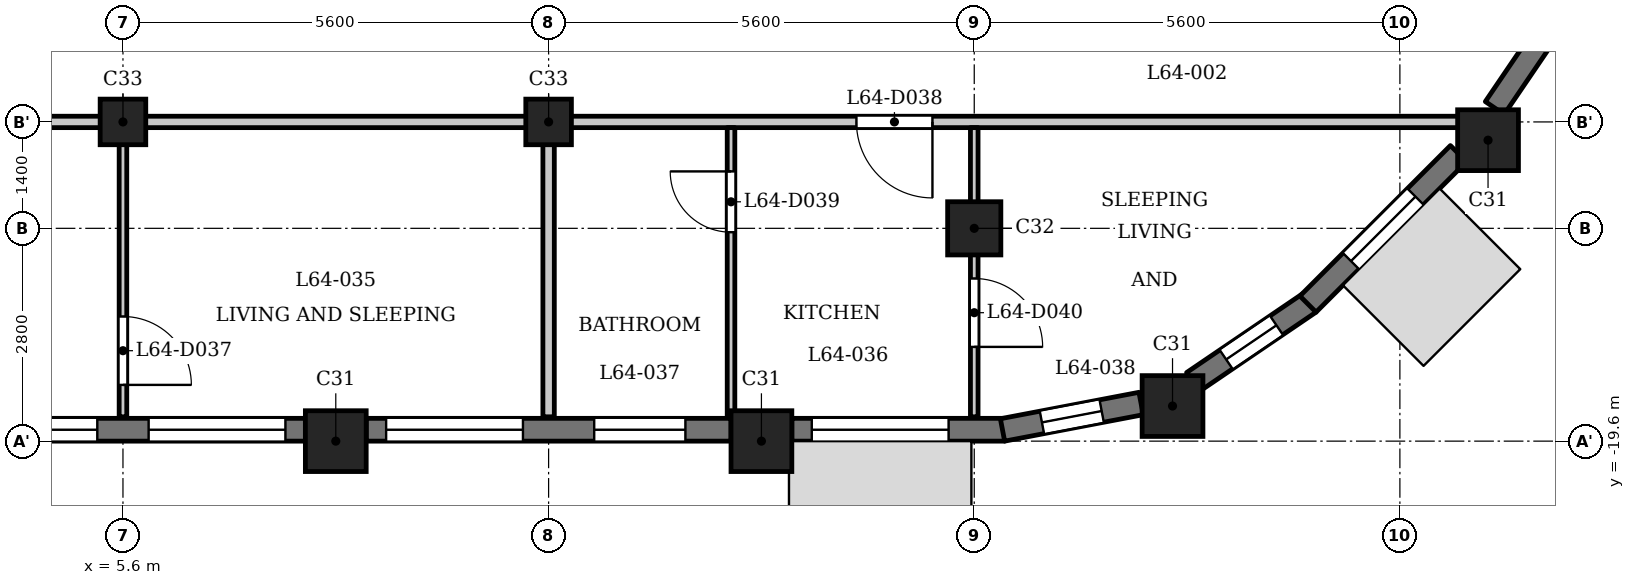
"""IFC4 building model, lengths in metres.
Left out: names, types, materials, properties, quantities, classifications, styles, units other than length and angle.
Written with IfcOpenShell. Run it as: python <this file> out.ifc"""

import sys

from ifc_helpers import new_model, si_unit, direction, frame, frame_2d, origin, origin_2d, place, context, subcontext, project, spatial, rectangle, extrude, element, fill, save


model = new_model("IFC4")
c1 = context("Model", 3, precision=1e-05, world=origin(), true_north=direction((0.0, 1.0)))
c2 = subcontext(c1, "Body", "Model", "MODEL_VIEW")
j1 = project(units=[si_unit("LENGTHUNIT", "METRE"), si_unit("PLANEANGLEUNIT", "RADIAN")], contexts=[c1])
p1 = place(None, origin())
s1 = spatial("IfcSite", under=j1, at=p1, CompositionType="ELEMENT")
p2 = place(p1, origin())
s2 = spatial("IfcBuilding", under=s1, at=p2, CompositionType="ELEMENT")
p3 = place(p2, frame((0.0, 0.0, 248.7)))
s3 = spatial("IfcBuildingStorey", under=s2, at=p3, CompositionType="ELEMENT", Elevation=248.7)
for number, where, z_axis, x_axis in (
    (1, (8.4, -19.6, 0.0), (0.0, 0.0, 1.0), (1.0, 0.0, 0.0)),
    (2, (14.0, -19.6, 0.0), (0.0, 0.0, 1.0), (1.0, 0.0, 0.0)),
    (3, (19.409, -19.138, 0.0), (0.0, 0.0, 1.0), (1.0, 0.0, 0.0)),
    (4, (23.56, -15.64, 0.0), (0.0, 0.0, 1.0), (1.0, 0.0, 0.0)),
):
    element("IfcColumn", number, at=place(p3, frame(where, z_axis=z_axis, x_axis=x_axis)), inside=s3, PredefinedType="COLUMN", context=c2, shape_type="SweptSolid", body=[
        extrude(rectangle(XDim=0.8, YDim=0.8, at=origin_2d()), origin(), (0.0, 0.0, 1.0), 3.5),
    ])
p4 = place(p3, frame((16.8, -16.8, 0.0), z_axis=(0.0, 0.0, 1.0), x_axis=(1.0, 0.0, 0.0)))
e5 = element("IfcColumn", 5, at=p4, inside=s3, PredefinedType="COLUMN", context=c2, shape_type="SweptSolid", body=[
    extrude(rectangle(XDim=0.7, YDim=0.7, at=origin_2d()), origin(), (0.0, 0.0, 1.0), 3.5),
])
for number, where, z_axis, x_axis in (
    (6, (5.6, -15.4, 0.0), (0.0, 0.0, 1.0), (1.0, 0.0, 0.0)),
    (7, (11.2, -15.4, 0.0), (0.0, 0.0, 1.0), (1.0, 0.0, 0.0)),
):
    element("IfcColumn", number, at=place(p3, frame(where, z_axis=z_axis, x_axis=x_axis)), inside=s3, PredefinedType="COLUMN", context=c2, shape_type="SweptSolid", body=[
        extrude(rectangle(XDim=0.6, YDim=0.6, at=origin_2d()), origin(), (0.0, 0.0, 1.0), 3.5),
    ])
p5 = place(p3, frame((3.2, -19.45, 0.0), z_axis=(0.0, 0.0, 1.0), x_axis=(1.0, 0.0, 0.0)))
e8 = element("IfcWall", 8, at=p5, inside=s3, PredefinedType="SOLIDWALL", context=c2, shape_type="SweptSolid", body=[
    extrude(rectangle(XDim=4.8, YDim=0.3, at=frame_2d((2.4, 0.0))), origin(), (0.0, 0.0, 1.0), 2.55),
])
p6 = place(p5, frame((0.262, 0.0, 0.9)))
e9 = element("IfcOpeningElement", 9, at=p6, cuts=e8, PredefinedType="OPENING", context=c2, shape_type="SweptSolid", body=[
    extrude(rectangle(XDim=1.8, YDim=1.25, at=frame_2d((0.9, 0.625))), frame((0.0, 0.16, 0.0), z_axis=(0.0, -1.0, 0.0), x_axis=(1.0, 0.0, 0.0)), (0.0, 0.0, 1.0), 0.32),
])
p7 = place(p5, frame((2.738, 0.0, 0.9)))
e10 = element("IfcOpeningElement", 10, at=p7, cuts=e8, PredefinedType="OPENING", context=c2, shape_type="SweptSolid", body=[
    extrude(rectangle(XDim=1.8, YDim=1.25, at=frame_2d((0.9, 0.625))), frame((0.0, 0.16, 0.0), z_axis=(0.0, -1.0, 0.0), x_axis=(1.0, 0.0, 0.0)), (0.0, 0.0, 1.0), 0.32),
])
p8 = place(p3, frame((8.8, -19.45, 0.0), z_axis=(0.0, 0.0, 1.0), x_axis=(1.0, 0.0, 0.0)))
e11 = element("IfcWall", 11, at=p8, inside=s3, PredefinedType="SOLIDWALL", context=c2, shape_type="SweptSolid", body=[
    extrude(rectangle(XDim=4.8, YDim=0.3, at=frame_2d((2.4, 0.0))), origin(), (0.0, 0.0, 1.0), 2.55),
])
p9 = place(p8, frame((0.262, 0.0, 0.9)))
e12 = element("IfcOpeningElement", 12, at=p9, cuts=e11, PredefinedType="OPENING", context=c2, shape_type="SweptSolid", body=[
    extrude(rectangle(XDim=1.8, YDim=1.25, at=frame_2d((0.9, 0.625))), frame((0.0, 0.16, 0.0), z_axis=(0.0, -1.0, 0.0), x_axis=(1.0, 0.0, 0.0)), (0.0, 0.0, 1.0), 0.32),
])
p10 = place(p8, frame((3.0, 0.0, 0.6)))
e13 = element("IfcOpeningElement", 13, at=p10, cuts=e11, PredefinedType="OPENING", context=c2, shape_type="SweptSolid", body=[
    extrude(rectangle(XDim=1.2, YDim=1.55, at=frame_2d((0.6, 0.775))), frame((0.0, 0.16, 0.0), z_axis=(0.0, -1.0, 0.0), x_axis=(1.0, 0.0, 0.0)), (0.0, 0.0, 1.0), 0.32),
])
p11 = place(p3, frame((14.4, -19.45, 0.0), z_axis=(0.0, 0.0, 1.0), x_axis=(1.0, 0.0, 0.0)))
e14 = element("IfcWall", 14, at=p11, inside=s3, PredefinedType="SOLIDWALL", context=c2, shape_type="SweptSolid", body=[
    extrude(rectangle(XDim=2.8, YDim=0.3, at=frame_2d((1.4, 0.0))), origin(), (0.0, 0.0, 1.0), 2.55),
])
p12 = place(p11, frame((0.262, 0.0, 0.9)))
e15 = element("IfcOpeningElement", 15, at=p12, cuts=e14, PredefinedType="OPENING", context=c2, shape_type="SweptSolid", body=[
    extrude(rectangle(XDim=1.8, YDim=1.25, at=frame_2d((0.9, 0.625))), frame((0.0, 0.16, 0.0), z_axis=(0.0, -1.0, 0.0), x_axis=(1.0, 0.0, 0.0)), (0.0, 0.0, 1.0), 0.32),
])
p13 = place(p3, frame((17.172, -19.453, 0.0), z_axis=(0.0, 0.0, 1.0), x_axis=(0.982301706131, 0.187305520826, 0.0)))
e16 = element("IfcWall", 16, at=p13, inside=s3, PredefinedType="SOLIDWALL", context=c2, shape_type="SweptSolid", body=[
    extrude(rectangle(XDim=1.856, YDim=0.3, at=frame_2d((0.928, 0.0))), origin(), (0.0, 0.0, 1.0), 2.55),
])
p14 = place(p13, frame((0.528, 0.0, 0.6)))
e17 = element("IfcOpeningElement", 17, at=p14, cuts=e16, PredefinedType="OPENING", context=c2, shape_type="SweptSolid", body=[
    extrude(rectangle(XDim=0.8, YDim=1.55, at=frame_2d((0.4, 0.775))), frame((0.0, 0.16, 0.0), z_axis=(0.0, -1.0, 0.0), x_axis=(1.0, 0.0, 0.0)), (0.0, 0.0, 1.0), 0.32),
])
p15 = place(p3, frame((19.678, -18.822, 0.0), z_axis=(0.0, 0.0, 1.0), x_axis=(0.826997446962, 0.562205676526, 0.0)))
e18 = element("IfcWall", 18, at=p15, inside=s3, PredefinedType="SOLIDWALL", context=c2, shape_type="SweptSolid", body=[
    extrude(rectangle(XDim=1.856, YDim=0.3, at=frame_2d((0.928, 0.0))), origin(), (0.0, 0.0, 1.0), 2.55),
])
p16 = place(p15, frame((0.528, 0.0, 0.6)))
e19 = element("IfcOpeningElement", 19, at=p16, cuts=e18, PredefinedType="OPENING", context=c2, shape_type="SweptSolid", body=[
    extrude(rectangle(XDim=0.8, YDim=1.55, at=frame_2d((0.4, 0.775))), frame((0.0, 0.16, 0.0), z_axis=(0.0, -1.0, 0.0), x_axis=(1.0, 0.0, 0.0)), (0.0, 0.0, 1.0), 0.32),
])
p17 = place(p3, frame((21.191, -17.797, 0.0), z_axis=(0.0, 0.0, 1.0), x_axis=(0.707106781187, 0.707106781187, 0.0)))
e20 = element("IfcWall", 20, at=p17, inside=s3, PredefinedType="SOLIDWALL", context=c2, shape_type="SweptSolid", body=[
    extrude(rectangle(XDim=2.8, YDim=0.3, at=frame_2d((1.4, 0.0))), origin(), (0.0, 0.0, 1.0), 2.55),
])
p18 = place(p17, frame((0.8, 0.0, 0.6)))
e21 = element("IfcOpeningElement", 21, at=p18, cuts=e20, PredefinedType="OPENING", context=c2, shape_type="SweptSolid", body=[
    extrude(rectangle(XDim=1.2, YDim=1.55, at=frame_2d((0.6, 0.775))), frame((0.0, 0.16, 0.0), z_axis=(0.0, -1.0, 0.0), x_axis=(1.0, 0.0, 0.0)), (0.0, 0.0, 1.0), 0.32),
])
p19 = place(p3, frame((23.648, -15.217, 0.0), z_axis=(0.0, 0.0, 1.0), x_axis=(0.562043265151, 0.827107833416, 0.0)))
e22 = element("IfcWall", 22, at=p19, inside=s3, PredefinedType="SOLIDWALL", context=c2, shape_type="SweptSolid", body=[
    extrude(rectangle(XDim=1.377, YDim=0.3, at=frame_2d((0.688, 0.0))), origin(), (0.0, 0.0, 1.0), 2.55),
])
p20 = place(p3, frame((-23.322, -15.4, 0.0), z_axis=(0.0, 0.0, 1.0), x_axis=(1.0, 0.0, 0.0)))
e23 = element("IfcWall", 23, at=p20, inside=s3, PredefinedType="PARTITIONING", context=c2, shape_type="SweptSolid", body=[
    extrude(rectangle(XDim=46.872, YDim=0.15, at=frame_2d((23.436, 0.0))), origin(), (0.0, 0.0, 1.0), 3.2),
])
p21 = place(p20, frame((7.172, 0.0, 0.0)))
e24 = element("IfcOpeningElement", 24, at=p21, cuts=e23, PredefinedType="OPENING", context=c2, shape_type="SweptSolid", body=[
    extrude(rectangle(XDim=1.0, YDim=2.1, at=frame_2d((0.5, 1.05))), frame((0.0, 0.085, 0.0), z_axis=(0.0, -1.0, 0.0), x_axis=(1.0, 0.0, 0.0)), (0.0, 0.0, 1.0), 0.17),
])
p22 = place(p20, frame((19.372, 0.0, 0.0)))
e25 = element("IfcOpeningElement", 25, at=p22, cuts=e23, PredefinedType="OPENING", context=c2, shape_type="SweptSolid", body=[
    extrude(rectangle(XDim=1.0, YDim=2.1, at=frame_2d((0.5, 1.05))), frame((0.0, 0.085, 0.0), z_axis=(0.0, -1.0, 0.0), x_axis=(1.0, 0.0, 0.0)), (0.0, 0.0, 1.0), 0.17),
])
p23 = place(p20, frame((26.372, 0.0, 0.0)))
e26 = element("IfcOpeningElement", 26, at=p23, cuts=e23, PredefinedType="OPENING", context=c2, shape_type="SweptSolid", body=[
    extrude(rectangle(XDim=1.0, YDim=2.1, at=frame_2d((0.5, 1.05))), frame((0.0, 0.085, 0.0), z_axis=(0.0, -1.0, 0.0), x_axis=(1.0, 0.0, 0.0)), (0.0, 0.0, 1.0), 0.17),
])
p24 = place(p20, frame((38.572, 0.0, 0.0)))
e27 = element("IfcOpeningElement", 27, at=p24, cuts=e23, PredefinedType="OPENING", context=c2, shape_type="SweptSolid", body=[
    extrude(rectangle(XDim=1.0, YDim=2.1, at=frame_2d((0.5, 1.05))), frame((0.0, 0.085, 0.0), z_axis=(0.0, -1.0, 0.0), x_axis=(1.0, 0.0, 0.0)), (0.0, 0.0, 1.0), 0.17),
])
p25 = place(p3, frame((5.6, -19.28, 0.0), z_axis=(0.0, 0.0, 1.0), x_axis=(0.0, 1.0, 0.0)))
e28 = element("IfcWall", 28, at=p25, inside=s3, PredefinedType="PARTITIONING", context=c2, shape_type="SweptSolid", body=[
    extrude(rectangle(XDim=3.805, YDim=0.1, at=frame_2d((1.902, 0.0))), origin(), (0.0, 0.0, 1.0), 3.2),
])
p26 = place(p25, frame((0.42, 0.0, 0.0)))
e29 = element("IfcOpeningElement", 29, at=p26, cuts=e28, PredefinedType="OPENING", context=c2, shape_type="SweptSolid", body=[
    extrude(rectangle(XDim=0.9, YDim=2.1, at=frame_2d((0.45, 1.05))), frame((0.0, 0.06, 0.0), z_axis=(0.0, -1.0, 0.0), x_axis=(1.0, 0.0, 0.0)), (0.0, 0.0, 1.0), 0.12),
])
p27 = place(p3, frame((11.2, -19.28, 0.0), z_axis=(0.0, 0.0, 1.0), x_axis=(0.0, 1.0, 0.0)))
e30 = element("IfcWall", 30, at=p27, inside=s3, PredefinedType="PARTITIONING", context=c2, shape_type="SweptSolid", body=[
    extrude(rectangle(XDim=3.805, YDim=0.15, at=frame_2d((1.902, 0.0))), origin(), (0.0, 0.0, 1.0), 3.2),
])
p28 = place(p3, frame((13.6, -19.28, 0.0), z_axis=(0.0, 0.0, 1.0), x_axis=(0.0, 1.0, 0.0)))
e31 = element("IfcWall", 31, at=p28, inside=s3, PredefinedType="PARTITIONING", context=c2, shape_type="SweptSolid", body=[
    extrude(rectangle(XDim=3.805, YDim=0.1, at=frame_2d((1.902, 0.0))), origin(), (0.0, 0.0, 1.0), 3.2),
])
p29 = place(p28, frame((2.429, 0.0, 0.0)))
e32 = element("IfcOpeningElement", 32, at=p29, cuts=e31, PredefinedType="OPENING", context=c2, shape_type="SweptSolid", body=[
    extrude(rectangle(XDim=0.8, YDim=2.1, at=frame_2d((0.4, 1.05))), frame((0.0, 0.06, 0.0), z_axis=(0.0, -1.0, 0.0), x_axis=(1.0, 0.0, 0.0)), (0.0, 0.0, 1.0), 0.12),
])
p30 = place(p3, frame((16.8, -19.28, 0.0), z_axis=(0.0, 0.0, 1.0), x_axis=(0.0, 1.0, 0.0)))
e33 = element("IfcWall", 33, at=p30, inside=s3, PredefinedType="PARTITIONING", context=c2, shape_type="SweptSolid", body=[
    extrude(rectangle(XDim=3.805, YDim=0.1, at=frame_2d((1.902, 0.0))), origin(), (0.0, 0.0, 1.0), 3.2),
])
p31 = place(p30, frame((0.92, 0.0, 0.0)))
e34 = element("IfcOpeningElement", 34, at=p31, cuts=e33, PredefinedType="OPENING", context=c2, shape_type="SweptSolid", body=[
    extrude(rectangle(XDim=0.9, YDim=2.1, at=frame_2d((0.45, 1.05))), frame((0.0, 0.06, 0.0), z_axis=(0.0, -1.0, 0.0), x_axis=(1.0, 0.0, 0.0)), (0.0, 0.0, 1.0), 0.12),
])
p32 = place(p26, origin())
e35 = element("IfcDoor", 35, at=p32, inside=s3, OperationType="SINGLE_SWING_LEFT", PredefinedType="DOOR", context=c2, shape_type="SweptSolid", body=[
    extrude(rectangle(XDim=0.9, YDim=2.1, at=frame_2d((0.45, 1.05))), frame((0.0, 0.025, 0.0), z_axis=(0.0, -1.0, 0.0), x_axis=(1.0, 0.0, 0.0)), (0.0, 0.0, 1.0), 0.05),
])
fill(e29, e35)
p33 = place(p24, origin())
e36 = element("IfcDoor", 36, at=p33, inside=s3, OperationType="SINGLE_SWING_RIGHT", PredefinedType="DOOR", context=c2, shape_type="SweptSolid", body=[
    extrude(rectangle(XDim=1.0, YDim=2.1, at=frame_2d((0.5, 1.05))), frame((0.0, 0.025, 0.0), z_axis=(0.0, -1.0, 0.0), x_axis=(1.0, 0.0, 0.0)), (0.0, 0.0, 1.0), 0.05),
])
fill(e27, e36)
p34 = place(p29, origin())
e37 = element("IfcDoor", 37, at=p34, inside=s3, OperationType="SINGLE_SWING_LEFT", PredefinedType="DOOR", context=c2, shape_type="SweptSolid", body=[
    extrude(rectangle(XDim=0.8, YDim=2.1, at=frame_2d((0.4, 1.05))), frame((0.0, 0.025, 0.0), z_axis=(0.0, -1.0, 0.0), x_axis=(1.0, 0.0, 0.0)), (0.0, 0.0, 1.0), 0.05),
])
fill(e32, e37)
p35 = place(p31, origin())
e38 = element("IfcDoor", 38, at=p35, inside=s3, OperationType="SINGLE_SWING_LEFT", PredefinedType="DOOR", context=c2, shape_type="SweptSolid", body=[
    extrude(rectangle(XDim=0.9, YDim=2.1, at=frame_2d((0.45, 1.05))), frame((0.0, 0.025, 0.0), z_axis=(0.0, -1.0, 0.0), x_axis=(1.0, 0.0, 0.0)), (0.0, 0.0, 1.0), 0.05),
])
fill(e34, e38)
p36 = place(p6, origin())
e39 = element("IfcWindow", 39, at=p36, inside=s3, PartitioningType="SINGLE_PANEL", PredefinedType="WINDOW", context=c2, shape_type="SweptSolid", body=[
    extrude(rectangle(XDim=1.8, YDim=1.25, at=frame_2d((0.9, 0.625))), frame((0.0, 0.03, 0.0), z_axis=(0.0, -1.0, 0.0), x_axis=(1.0, 0.0, 0.0)), (0.0, 0.0, 1.0), 0.06),
])
fill(e9, e39)
p37 = place(p7, origin())
e40 = element("IfcWindow", 40, at=p37, inside=s3, PartitioningType="SINGLE_PANEL", PredefinedType="WINDOW", context=c2, shape_type="SweptSolid", body=[
    extrude(rectangle(XDim=1.8, YDim=1.25, at=frame_2d((0.9, 0.625))), frame((0.0, 0.03, 0.0), z_axis=(0.0, -1.0, 0.0), x_axis=(1.0, 0.0, 0.0)), (0.0, 0.0, 1.0), 0.06),
])
fill(e10, e40)
p38 = place(p9, origin())
e41 = element("IfcWindow", 41, at=p38, inside=s3, PartitioningType="SINGLE_PANEL", PredefinedType="WINDOW", context=c2, shape_type="SweptSolid", body=[
    extrude(rectangle(XDim=1.8, YDim=1.25, at=frame_2d((0.9, 0.625))), frame((0.0, 0.03, 0.0), z_axis=(0.0, -1.0, 0.0), x_axis=(1.0, 0.0, 0.0)), (0.0, 0.0, 1.0), 0.06),
])
fill(e12, e41)
p39 = place(p10, origin())
e42 = element("IfcWindow", 42, at=p39, inside=s3, PartitioningType="SINGLE_PANEL", PredefinedType="WINDOW", context=c2, shape_type="SweptSolid", body=[
    extrude(rectangle(XDim=1.2, YDim=1.55, at=frame_2d((0.6, 0.775))), frame((0.0, 0.03, 0.0), z_axis=(0.0, -1.0, 0.0), x_axis=(1.0, 0.0, 0.0)), (0.0, 0.0, 1.0), 0.06),
])
fill(e13, e42)
p40 = place(p12, origin())
e43 = element("IfcWindow", 43, at=p40, inside=s3, PartitioningType="SINGLE_PANEL", PredefinedType="WINDOW", context=c2, shape_type="SweptSolid", body=[
    extrude(rectangle(XDim=1.8, YDim=1.25, at=frame_2d((0.9, 0.625))), frame((0.0, 0.03, 0.0), z_axis=(0.0, -1.0, 0.0), x_axis=(1.0, 0.0, 0.0)), (0.0, 0.0, 1.0), 0.06),
])
fill(e15, e43)
p41 = place(p14, origin())
e44 = element("IfcWindow", 44, at=p41, inside=s3, PartitioningType="SINGLE_PANEL", PredefinedType="WINDOW", context=c2, shape_type="SweptSolid", body=[
    extrude(rectangle(XDim=0.8, YDim=1.55, at=frame_2d((0.4, 0.775))), frame((0.0, 0.03, 0.0), z_axis=(0.0, -1.0, 0.0), x_axis=(1.0, 0.0, 0.0)), (0.0, 0.0, 1.0), 0.06),
])
fill(e17, e44)
p42 = place(p16, origin())
e45 = element("IfcWindow", 45, at=p42, inside=s3, PartitioningType="SINGLE_PANEL", PredefinedType="WINDOW", context=c2, shape_type="SweptSolid", body=[
    extrude(rectangle(XDim=0.8, YDim=1.55, at=frame_2d((0.4, 0.775))), frame((0.0, 0.03, 0.0), z_axis=(0.0, -1.0, 0.0), x_axis=(1.0, 0.0, 0.0)), (0.0, 0.0, 1.0), 0.06),
])
fill(e19, e45)
p43 = place(p18, origin())
e46 = element("IfcWindow", 46, at=p43, inside=s3, PartitioningType="SINGLE_PANEL", PredefinedType="WINDOW", context=c2, shape_type="SweptSolid", body=[
    extrude(rectangle(XDim=1.2, YDim=1.55, at=frame_2d((0.6, 0.775))), frame((0.0, 0.03, 0.0), z_axis=(0.0, -1.0, 0.0), x_axis=(1.0, 0.0, 0.0)), (0.0, 0.0, 1.0), 0.06),
])
fill(e21, e46)
save(model, sys.argv[1])
